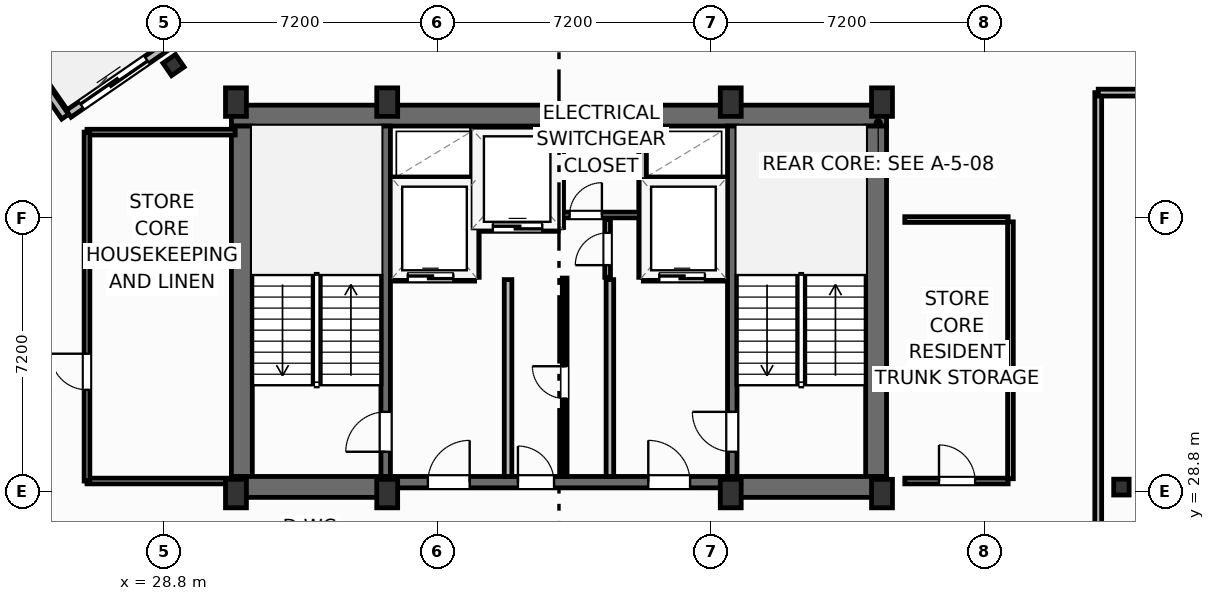
"""IFC4 building model, lengths in metres.
Left out: names, types, materials, properties, quantities, classifications, styles, units other than length and angle.
Written with IfcOpenShell. Run it as: python <this file> out.ifc"""

import sys

from ifc_helpers import new_model, si_unit, direction, frame, frame_2d, origin, origin_2d, place, context, subcontext, project, spatial, rectangle, i_section, extrude, element, fill, save


model = new_model("IFC4")
c1 = context("Model", 3, precision=1e-05, world=origin(), true_north=direction((0.0, 1.0)))
c2 = subcontext(c1, "Body", "Model", "MODEL_VIEW")
j1 = project(units=[si_unit("LENGTHUNIT", "METRE"), si_unit("PLANEANGLEUNIT", "RADIAN")], contexts=[c1])
p1 = place(None, origin())
s1 = spatial("IfcSite", under=j1, at=p1, CompositionType="ELEMENT")
p2 = place(p1, origin())
s2 = spatial("IfcBuilding", under=s1, at=p2, CompositionType="ELEMENT")
p3 = place(p2, frame((0.0, 0.0, 261.9)))
s3 = spatial("IfcBuildingStorey", under=s2, at=p3, CompositionType="ELEMENT", Elevation=261.9)
for number, where, z_axis, x_axis in (
    (1, (30.7, 28.75, 0.0), (0.0, 0.0, 1.0), (1.0, 0.0, 0.0)),
    (2, (34.68, 28.75, 0.0), (0.0, 0.0, 1.0), (1.0, 0.0, 0.0)),
    (3, (43.72, 28.75, 0.0), (0.0, 0.0, 1.0), (1.0, 0.0, 0.0)),
    (4, (47.7, 28.75, 0.0), (0.0, 0.0, 1.0), (1.0, 0.0, 0.0)),
    (5, (30.7, 39.05, 0.0), (0.0, 0.0, 1.0), (1.0, 0.0, 0.0)),
    (6, (34.68, 39.05, 0.0), (0.0, 0.0, 1.0), (1.0, 0.0, 0.0)),
    (7, (43.72, 39.05, 0.0), (0.0, 0.0, 1.0), (1.0, 0.0, 0.0)),
    (8, (47.7, 39.05, 0.0), (0.0, 0.0, 1.0), (1.0, 0.0, 0.0)),
):
    element("IfcColumn", number, at=place(p3, frame(where, z_axis=z_axis, x_axis=x_axis)), inside=s3, PredefinedType="COLUMN", context=c2, shape_type="SweptSolid", body=[
        extrude(rectangle(XDim=0.55, YDim=0.75, at=origin_2d()), origin(), (0.0, 0.0, 1.0), 3.7),
    ])
p4 = place(p3, frame((54.0, 28.92, 0.0), z_axis=(0.0, 0.0, 1.0), x_axis=(1.0, 0.0, 0.0)))
e9 = element("IfcColumn", 9, at=p4, inside=s3, PredefinedType="COLUMN", context=c2, shape_type="SweptSolid", body=[
    extrude(i_section(OverallWidth=0.406, OverallDepth=0.416, WebThickness=0.03, FlangeThickness=0.048, FilletRadius=0.025, at=origin_2d()), origin(), (0.0, 0.0, 1.0), 3.7),
])
p5 = place(p3, frame((30.58, 38.695, 0.0), z_axis=(0.0, 0.0, 1.0), x_axis=(1.0, 0.0, 0.0)))
e10 = element("IfcWall", 10, at=p5, inside=s3, PredefinedType="SHEAR", context=c2, shape_type="SweptSolid", body=[
    extrude(rectangle(XDim=17.24, YDim=0.55, at=frame_2d((8.62, 0.0))), origin(), (0.0, 0.0, 1.0), 3.45),
])
for number, where, z_axis, x_axis in (
    (11, (30.855, 29.2, 0.0), (0.0, 0.0, 1.0), (0.0, 1.0, 0.0)),
    (12, (47.545, 29.2, 0.0), (0.0, 0.0, 1.0), (0.0, 1.0, 0.0)),
):
    element("IfcWall", number, at=place(p3, frame(where, z_axis=z_axis, x_axis=x_axis)), inside=s3, PredefinedType="SHEAR", context=c2, shape_type="SweptSolid", body=[
        extrude(rectangle(XDim=9.22, YDim=0.55, at=frame_2d((4.61, 0.0))), origin(), (0.0, 0.0, 1.0), 3.45),
    ])
for number, where, z_axis, x_axis in (
    (13, (30.58, 28.925, 0.0), (0.0, 0.0, 1.0), (1.0, 0.0, 0.0)),
    (14, (43.6, 28.925, 0.0), (0.0, 0.0, 1.0), (1.0, 0.0, 0.0)),
):
    element("IfcWall", number, at=place(p3, frame(where, z_axis=z_axis, x_axis=x_axis)), inside=s3, PredefinedType="SHEAR", context=c2, shape_type="SweptSolid", body=[
        extrude(rectangle(XDim=4.22, YDim=0.55, at=frame_2d((2.11, 0.0))), origin(), (0.0, 0.0, 1.0), 3.45),
    ])
p6 = place(p3, frame((34.8, 29.05, 0.0), z_axis=(0.0, 0.0, 1.0), x_axis=(1.0, 0.0, 0.0)))
e15 = element("IfcWall", 15, at=p6, inside=s3, PredefinedType="SHEAR", context=c2, shape_type="SweptSolid", body=[
    extrude(rectangle(XDim=8.8, YDim=0.3, at=frame_2d((4.4, 0.0))), origin(), (0.0, 0.0, 1.0), 3.45),
])
p7 = place(p6, frame((0.95, 0.0, 0.0)))
e16 = element("IfcOpeningElement", 16, at=p7, cuts=e15, PredefinedType="OPENING", context=c2, shape_type="SweptSolid", body=[
    extrude(rectangle(XDim=1.1, YDim=2.15, at=frame_2d((0.55, 1.075))), frame((0.0, 0.16, 0.0), z_axis=(0.0, -1.0, 0.0), x_axis=(1.0, 0.0, 0.0)), (0.0, 0.0, 1.0), 0.32),
])
p8 = place(p6, frame((6.75, 0.0, 0.0)))
e17 = element("IfcOpeningElement", 17, at=p8, cuts=e15, PredefinedType="OPENING", context=c2, shape_type="SweptSolid", body=[
    extrude(rectangle(XDim=1.1, YDim=2.15, at=frame_2d((0.55, 1.075))), frame((0.0, 0.16, 0.0), z_axis=(0.0, -1.0, 0.0), x_axis=(1.0, 0.0, 0.0)), (0.0, 0.0, 1.0), 0.32),
])
p9 = place(p6, frame((3.32, 0.0, 0.0)))
e18 = element("IfcOpeningElement", 18, at=p9, cuts=e15, PredefinedType="OPENING", context=c2, shape_type="SweptSolid", body=[
    extrude(rectangle(XDim=0.95, YDim=2.15, at=frame_2d((0.475, 1.075))), frame((0.0, 0.16, 0.0), z_axis=(0.0, -1.0, 0.0), x_axis=(1.0, 0.0, 0.0)), (0.0, 0.0, 1.0), 0.32),
])
p10 = place(p3, frame((34.64, 29.2, 0.0), z_axis=(0.0, 0.0, 1.0), x_axis=(0.0, 1.0, 0.0)))
e19 = element("IfcWall", 19, at=p10, inside=s3, PredefinedType="SHEAR", context=c2, shape_type="SweptSolid", body=[
    extrude(rectangle(XDim=9.22, YDim=0.25, at=frame_2d((4.61, 0.0))), origin(), (0.0, 0.0, 1.0), 3.45),
])
p11 = place(p10, frame((0.65, 0.0, 0.0)))
e20 = element("IfcOpeningElement", 20, at=p11, cuts=e19, PredefinedType="OPENING", context=c2, shape_type="SweptSolid", body=[
    extrude(rectangle(XDim=1.05, YDim=2.15, at=frame_2d((0.525, 1.075))), frame((0.0, 0.135, 0.0), z_axis=(0.0, -1.0, 0.0), x_axis=(1.0, 0.0, 0.0)), (0.0, 0.0, 1.0), 0.27),
])
p12 = place(p3, frame((43.76, 29.2, 0.0), z_axis=(0.0, 0.0, 1.0), x_axis=(0.0, 1.0, 0.0)))
e21 = element("IfcWall", 21, at=p12, inside=s3, PredefinedType="SHEAR", context=c2, shape_type="SweptSolid", body=[
    extrude(rectangle(XDim=9.22, YDim=0.25, at=frame_2d((4.61, 0.0))), origin(), (0.0, 0.0, 1.0), 3.45),
])
p13 = place(p12, frame((0.65, 0.0, 0.0)))
e22 = element("IfcOpeningElement", 22, at=p13, cuts=e21, PredefinedType="OPENING", context=c2, shape_type="SweptSolid", body=[
    extrude(rectangle(XDim=1.05, YDim=2.15, at=frame_2d((0.525, 1.075))), frame((0.0, 0.135, 0.0), z_axis=(0.0, -1.0, 0.0), x_axis=(1.0, 0.0, 0.0)), (0.0, 0.0, 1.0), 0.27),
])
p14 = place(p3, frame((29.057, 40.025, 0.0), z_axis=(0.0, 0.0, 1.0), x_axis=(0.823532597628, 0.567268949127, 0.0)))
e23 = element("IfcColumn", 23, at=p14, inside=s3, PredefinedType="COLUMN", context=c2, shape_type="SweptSolid", body=[
    extrude(i_section(OverallWidth=0.401, OverallDepth=0.399, WebThickness=0.025, FlangeThickness=0.04, FilletRadius=0.022, at=origin_2d()), origin(), (0.0, 0.0, 1.0), 3.7),
])
p15 = place(p3, frame((26.297, 38.743, 0.0), z_axis=(0.0, 0.0, 1.0), x_axis=(0.823534636215, 0.567265989598, 0.0)))
e24 = element("IfcWall", 24, at=p15, inside=s3, PredefinedType="SOLIDWALL", context=c2, shape_type="SweptSolid", body=[
    extrude(rectangle(XDim=6.0, YDim=0.22, at=frame_2d((3.0, 0.0))), origin(), (0.0, 0.0, 1.0), 2.73),
])
p16 = place(p15, frame((0.4, 0.0, 0.0)))
e25 = element("IfcOpeningElement", 25, at=p16, cuts=e24, PredefinedType="OPENING", context=c2, shape_type="SweptSolid", body=[
    extrude(rectangle(XDim=2.1, YDim=2.3, at=frame_2d((1.05, 1.15))), frame((0.0, 0.12, 0.0), z_axis=(0.0, -1.0, 0.0), x_axis=(1.0, 0.0, 0.0)), (0.0, 0.0, 1.0), 0.24),
])
p17 = place(p3, frame((26.204, 38.667, 0.0), z_axis=(0.0, 0.0, 1.0), x_axis=(-0.567219383419, 0.823566737474, 0.0)))
e26 = element("IfcWall", 26, at=p17, inside=s3, PredefinedType="SOLIDWALL", context=c2, shape_type="SweptSolid", body=[
    extrude(rectangle(XDim=2.1, YDim=0.22, at=frame_2d((1.05, 0.0))), origin(), (0.0, 0.0, 1.0), 2.73),
])
p18 = place(p3, frame((53.39, 19.24, 0.0), z_axis=(0.0, 0.0, 1.0), x_axis=(0.0, 1.0, 0.0)))
e27 = element("IfcWall", 27, at=p18, inside=s3, PredefinedType="PARTITIONING", context=c2, shape_type="SweptSolid", body=[
    extrude(rectangle(XDim=20.06, YDim=0.18, at=frame_2d((10.03, 0.0))), origin(), (0.0, 0.0, 1.0), 3.45),
])
p19 = place(p18, frame((7.7, 0.0, 0.0)))
e28 = element("IfcOpeningElement", 28, at=p19, cuts=e27, PredefinedType="OPENING", context=c2, shape_type="SweptSolid", body=[
    extrude(rectangle(XDim=0.95, YDim=2.05, at=frame_2d((0.475, 1.025))), frame((0.0, 0.1, 0.0), z_axis=(0.0, -1.0, 0.0), x_axis=(1.0, 0.0, 0.0)), (0.0, 0.0, 1.0), 0.2),
])
p20 = place(p3, frame((53.39, 39.3, 0.0), z_axis=(0.0, 0.0, 1.0), x_axis=(1.0, 0.0, 0.0)))
e29 = element("IfcWall", 29, at=p20, inside=s3, PredefinedType="PARTITIONING", context=c2, shape_type="SweptSolid", body=[
    extrude(rectangle(XDim=16.149, YDim=0.18, at=frame_2d((8.075, 0.0))), origin(), (0.0, 0.0, 1.0), 2.739),
])
for number, where, z_axis, x_axis in (
    (30, (37.86, 29.2, 0.0), (0.0, 0.0, 1.0), (0.0, 1.0, 0.0)),
    (31, (40.54, 29.2, 0.0), (0.0, 0.0, 1.0), (0.0, 1.0, 0.0)),
):
    element("IfcWall", number, at=place(p3, frame(where, z_axis=z_axis, x_axis=x_axis)), inside=s3, PredefinedType="PARTITIONING", context=c2, shape_type="SweptSolid", body=[
        extrude(rectangle(XDim=5.18, YDim=0.2, at=frame_2d((2.59, 0.0))), origin(), (0.0, 0.0, 1.0), 3.45),
    ])
p21 = place(p3, frame((34.8, 34.44, 0.0), z_axis=(0.0, 0.0, 1.0), x_axis=(1.0, 0.0, 0.0)))
e32 = element("IfcWall", 32, at=p21, inside=s3, PredefinedType="PARTITIONING", context=c2, shape_type="SweptSolid", body=[
    extrude(rectangle(XDim=2.18, YDim=0.2, at=frame_2d((1.09, 0.0))), origin(), (0.0, 0.0, 1.0), 3.45),
])
p22 = place(p21, frame((0.42, 0.0, 0.0)))
e33 = element("IfcOpeningElement", 33, at=p22, cuts=e32, PredefinedType="OPENING", context=c2, shape_type="SweptSolid", body=[
    extrude(rectangle(XDim=1.2, YDim=2.2, at=frame_2d((0.6, 1.1))), frame((0.0, 0.11, 0.0), z_axis=(0.0, -1.0, 0.0), x_axis=(1.0, 0.0, 0.0)), (0.0, 0.0, 1.0), 0.22),
])
p23 = place(p3, frame((34.8, 36.98, 0.0), z_axis=(0.0, 0.0, 1.0), x_axis=(1.0, 0.0, 0.0)))
e34 = element("IfcWall", 34, at=p23, inside=s3, PredefinedType="PARTITIONING", context=c2, shape_type="SweptSolid", body=[
    extrude(rectangle(XDim=2.18, YDim=0.2, at=frame_2d((1.09, 0.0))), origin(), (0.0, 0.0, 1.0), 3.45),
])
p24 = place(p3, frame((37.0, 34.44, 0.0), z_axis=(0.0, 0.0, 1.0), x_axis=(0.0, 1.0, 0.0)))
e35 = element("IfcWall", 35, at=p24, inside=s3, PredefinedType="PARTITIONING", context=c2, shape_type="SweptSolid", body=[
    extrude(rectangle(XDim=3.9, YDim=0.2, at=frame_2d((1.95, 0.0))), origin(), (0.0, 0.0, 1.0), 3.45),
])
p25 = place(p3, frame((41.42, 34.44, 0.0), z_axis=(0.0, 0.0, 1.0), x_axis=(1.0, 0.0, 0.0)))
e36 = element("IfcWall", 36, at=p25, inside=s3, PredefinedType="PARTITIONING", context=c2, shape_type="SweptSolid", body=[
    extrude(rectangle(XDim=2.18, YDim=0.2, at=frame_2d((1.09, 0.0))), origin(), (0.0, 0.0, 1.0), 3.45),
])
p26 = place(p25, frame((0.42, 0.0, 0.0)))
e37 = element("IfcOpeningElement", 37, at=p26, cuts=e36, PredefinedType="OPENING", context=c2, shape_type="SweptSolid", body=[
    extrude(rectangle(XDim=1.2, YDim=2.2, at=frame_2d((0.6, 1.1))), frame((0.0, 0.11, 0.0), z_axis=(0.0, -1.0, 0.0), x_axis=(1.0, 0.0, 0.0)), (0.0, 0.0, 1.0), 0.22),
])
p27 = place(p3, frame((41.42, 36.98, 0.0), z_axis=(0.0, 0.0, 1.0), x_axis=(1.0, 0.0, 0.0)))
e38 = element("IfcWall", 38, at=p27, inside=s3, PredefinedType="PARTITIONING", context=c2, shape_type="SweptSolid", body=[
    extrude(rectangle(XDim=2.18, YDim=0.2, at=frame_2d((1.09, 0.0))), origin(), (0.0, 0.0, 1.0), 3.45),
])
p28 = place(p3, frame((41.4, 34.44, 0.0), z_axis=(0.0, 0.0, 1.0), x_axis=(0.0, 1.0, 0.0)))
e39 = element("IfcWall", 39, at=p28, inside=s3, PredefinedType="PARTITIONING", context=c2, shape_type="SweptSolid", body=[
    extrude(rectangle(XDim=3.9, YDim=0.2, at=frame_2d((1.95, 0.0))), origin(), (0.0, 0.0, 1.0), 3.45),
])
p29 = place(p3, frame((37.06, 35.75, 0.0), z_axis=(0.0, 0.0, 1.0), x_axis=(1.0, 0.0, 0.0)))
e40 = element("IfcWall", 40, at=p29, inside=s3, PredefinedType="PARTITIONING", context=c2, shape_type="SweptSolid", body=[
    extrude(rectangle(XDim=2.12, YDim=0.2, at=frame_2d((1.06, 0.0))), origin(), (0.0, 0.0, 1.0), 3.45),
])
p30 = place(p29, frame((0.4, 0.0, 0.0)))
e41 = element("IfcOpeningElement", 41, at=p30, cuts=e40, PredefinedType="OPENING", context=c2, shape_type="SweptSolid", body=[
    extrude(rectangle(XDim=1.3, YDim=2.2, at=frame_2d((0.65, 1.1))), frame((0.0, 0.11, 0.0), z_axis=(0.0, -1.0, 0.0), x_axis=(1.0, 0.0, 0.0)), (0.0, 0.0, 1.0), 0.22),
])
p31 = place(p3, frame((39.22, 35.75, 0.0), z_axis=(0.0, 0.0, 1.0), x_axis=(0.0, 1.0, 0.0)))
e42 = element("IfcWall", 42, at=p31, inside=s3, PredefinedType="PARTITIONING", context=c2, shape_type="SweptSolid", body=[
    extrude(rectangle(XDim=2.59, YDim=0.2, at=frame_2d((1.295, 0.0))), origin(), (0.0, 0.0, 1.0), 3.45),
])
p32 = place(p3, frame((39.3, 36.08, 0.0), z_axis=(0.0, 0.0, 1.0), x_axis=(1.0, 0.0, 0.0)))
e43 = element("IfcWall", 43, at=p32, inside=s3, PredefinedType="PARTITIONING", context=c2, shape_type="SweptSolid", body=[
    extrude(rectangle(XDim=2.02, YDim=0.15, at=frame_2d((1.01, 0.0))), origin(), (0.0, 0.0, 1.0), 3.45),
])
p33 = place(p32, frame((0.18, 0.0, 0.0)))
e44 = element("IfcOpeningElement", 44, at=p33, cuts=e43, PredefinedType="OPENING", context=c2, shape_type="SweptSolid", body=[
    extrude(rectangle(XDim=0.85, YDim=2.05, at=frame_2d((0.425, 1.025))), frame((0.0, 0.085, 0.0), z_axis=(0.0, -1.0, 0.0), x_axis=(1.0, 0.0, 0.0)), (0.0, 0.0, 1.0), 0.17),
])
p34 = place(p3, frame((40.48, 34.44, 0.0), z_axis=(0.0, 0.0, 1.0), x_axis=(0.0, 1.0, 0.0)))
e45 = element("IfcWall", 45, at=p34, inside=s3, PredefinedType="PARTITIONING", context=c2, shape_type="SweptSolid", body=[
    extrude(rectangle(XDim=1.52, YDim=0.15, at=frame_2d((0.76, 0.0))), origin(), (0.0, 0.0, 1.0), 3.45),
])
p35 = place(p34, frame((0.32, 0.0, 0.0)))
e46 = element("IfcOpeningElement", 46, at=p35, cuts=e45, PredefinedType="OPENING", context=c2, shape_type="SweptSolid", body=[
    extrude(rectangle(XDim=0.85, YDim=2.05, at=frame_2d((0.425, 1.025))), frame((0.0, 0.085, 0.0), z_axis=(0.0, -1.0, 0.0), x_axis=(1.0, 0.0, 0.0)), (0.0, 0.0, 1.0), 0.17),
])
p36 = place(p3, frame((39.35, 29.2, 0.0), z_axis=(0.0, 0.0, 1.0), x_axis=(0.0, 1.0, 0.0)))
e47 = element("IfcWall", 47, at=p36, inside=s3, PredefinedType="PARTITIONING", context=c2, shape_type="SweptSolid", body=[
    extrude(rectangle(XDim=5.22, YDim=0.125, at=frame_2d((2.61, 0.0))), origin(), (0.0, 0.0, 1.0), 3.45),
])
p37 = place(p36, frame((2.05, 0.0, 0.0)))
e48 = element("IfcOpeningElement", 48, at=p37, cuts=e47, PredefinedType="OPENING", context=c2, shape_type="SweptSolid", body=[
    extrude(rectangle(XDim=0.85, YDim=2.05, at=frame_2d((0.425, 1.025))), frame((0.0, 0.073, 0.0), z_axis=(0.0, -1.0, 0.0), x_axis=(1.0, 0.0, 0.0)), (0.0, 0.0, 1.0), 0.145),
])
p38 = place(p3, frame((26.78, 29.08, 0.0), z_axis=(0.0, 0.0, 1.0), x_axis=(1.0, 0.0, 0.0)))
e49 = element("IfcWall", 49, at=p38, inside=s3, PredefinedType="PARTITIONING", context=c2, shape_type="SweptSolid", body=[
    extrude(rectangle(XDim=3.8, YDim=0.15, at=frame_2d((1.9, 0.0))), origin(), (0.0, 0.0, 1.0), 3.45),
])
p39 = place(p3, frame((26.78, 38.26, 0.0), z_axis=(0.0, 0.0, 1.0), x_axis=(1.0, 0.0, 0.0)))
e50 = element("IfcWall", 50, at=p39, inside=s3, PredefinedType="PARTITIONING", context=c2, shape_type="SweptSolid", body=[
    extrude(rectangle(XDim=3.9, YDim=0.15, at=frame_2d((1.95, 0.0))), origin(), (0.0, 0.0, 1.0), 3.45),
])
p40 = place(p3, frame((26.78, 29.08, 0.0), z_axis=(0.0, 0.0, 1.0), x_axis=(0.0, 1.0, 0.0)))
e51 = element("IfcWall", 51, at=p40, inside=s3, PredefinedType="PARTITIONING", context=c2, shape_type="SweptSolid", body=[
    extrude(rectangle(XDim=9.18, YDim=0.15, at=frame_2d((4.59, 0.0))), origin(), (0.0, 0.0, 1.0), 3.45),
])
p41 = place(p40, frame((2.4, 0.0, 0.0)))
e52 = element("IfcOpeningElement", 52, at=p41, cuts=e51, PredefinedType="OPENING", context=c2, shape_type="SweptSolid", body=[
    extrude(rectangle(XDim=0.95, YDim=2.05, at=frame_2d((0.475, 1.025))), frame((0.0, 0.085, 0.0), z_axis=(0.0, -1.0, 0.0), x_axis=(1.0, 0.0, 0.0)), (0.0, 0.0, 1.0), 0.17),
])
p42 = place(p3, frame((48.3, 29.08, 0.0), z_axis=(0.0, 0.0, 1.0), x_axis=(1.0, 0.0, 0.0)))
e53 = element("IfcWall", 53, at=p42, inside=s3, PredefinedType="PARTITIONING", context=c2, shape_type="SweptSolid", body=[
    extrude(rectangle(XDim=2.72, YDim=0.15, at=frame_2d((1.36, 0.0))), origin(), (0.0, 0.0, 1.0), 2.662),
])
p43 = place(p42, frame((0.9, 0.0, 0.0)))
e54 = element("IfcOpeningElement", 54, at=p43, cuts=e53, PredefinedType="OPENING", context=c2, shape_type="SweptSolid", body=[
    extrude(rectangle(XDim=0.95, YDim=2.05, at=frame_2d((0.475, 1.025))), frame((0.0, 0.085, 0.0), z_axis=(0.0, -1.0, 0.0), x_axis=(1.0, 0.0, 0.0)), (0.0, 0.0, 1.0), 0.17),
])
p44 = place(p3, frame((48.3, 35.96, 0.0), z_axis=(0.0, 0.0, 1.0), x_axis=(1.0, 0.0, 0.0)))
e55 = element("IfcWall", 55, at=p44, inside=s3, PredefinedType="PARTITIONING", context=c2, shape_type="SweptSolid", body=[
    extrude(rectangle(XDim=2.72, YDim=0.15, at=frame_2d((1.36, 0.0))), origin(), (0.0, 0.0, 1.0), 3.45),
])
p45 = place(p3, frame((51.08, 29.14, 0.0), z_axis=(0.0, 0.0, 1.0), x_axis=(0.0, 1.0, 0.0)))
e56 = element("IfcWall", 56, at=p45, inside=s3, PredefinedType="PARTITIONING", context=c2, shape_type="SweptSolid", body=[
    extrude(rectangle(XDim=6.76, YDim=0.15, at=frame_2d((3.38, 0.0))), origin(), (0.0, 0.0, 1.0), 3.45),
])
p46 = place(p16, origin())
e57 = element("IfcDoor", 57, at=p46, inside=s3, OperationType="SLIDING_TO_LEFT", PredefinedType="DOOR", context=c2, shape_type="SweptSolid", body=[
    extrude(rectangle(XDim=2.1, YDim=2.3, at=frame_2d((1.05, 1.15))), frame((0.0, 0.025, 0.0), z_axis=(0.0, -1.0, 0.0), x_axis=(1.0, 0.0, 0.0)), (0.0, 0.0, 1.0), 0.05),
])
fill(e25, e57)
p47 = place(p11, origin())
e58 = element("IfcDoor", 58, at=p47, inside=s3, OperationType="SINGLE_SWING_LEFT", PredefinedType="DOOR", context=c2, shape_type="SweptSolid", body=[
    extrude(rectangle(XDim=1.05, YDim=2.15, at=frame_2d((0.525, 1.075))), frame((0.0, 0.025, 0.0), z_axis=(0.0, -1.0, 0.0), x_axis=(1.0, 0.0, 0.0)), (0.0, 0.0, 1.0), 0.05),
])
fill(e20, e58)
p48 = place(p13, origin())
e59 = element("IfcDoor", 59, at=p48, inside=s3, OperationType="SINGLE_SWING_RIGHT", PredefinedType="DOOR", context=c2, shape_type="SweptSolid", body=[
    extrude(rectangle(XDim=1.05, YDim=2.15, at=frame_2d((0.525, 1.075))), frame((0.0, 0.025, 0.0), z_axis=(0.0, -1.0, 0.0), x_axis=(1.0, 0.0, 0.0)), (0.0, 0.0, 1.0), 0.05),
])
fill(e22, e59)
p49 = place(p7, origin())
e60 = element("IfcDoor", 60, at=p49, inside=s3, OperationType="SINGLE_SWING_RIGHT", PredefinedType="DOOR", context=c2, shape_type="SweptSolid", body=[
    extrude(rectangle(XDim=1.1, YDim=2.15, at=frame_2d((0.55, 1.075))), frame((0.0, 0.025, 0.0), z_axis=(0.0, -1.0, 0.0), x_axis=(1.0, 0.0, 0.0)), (0.0, 0.0, 1.0), 0.05),
])
fill(e16, e60)
p50 = place(p8, origin())
e61 = element("IfcDoor", 61, at=p50, inside=s3, OperationType="SINGLE_SWING_LEFT", PredefinedType="DOOR", context=c2, shape_type="SweptSolid", body=[
    extrude(rectangle(XDim=1.1, YDim=2.15, at=frame_2d((0.55, 1.075))), frame((0.0, 0.025, 0.0), z_axis=(0.0, -1.0, 0.0), x_axis=(1.0, 0.0, 0.0)), (0.0, 0.0, 1.0), 0.05),
])
fill(e17, e61)
p51 = place(p22, origin())
e62 = element("IfcDoor", 62, at=p51, inside=s3, OperationType="SLIDING_TO_LEFT", PredefinedType="DOOR", context=c2, shape_type="SweptSolid", body=[
    extrude(rectangle(XDim=1.2, YDim=2.2, at=frame_2d((0.6, 1.1))), frame((0.0, 0.025, 0.0), z_axis=(0.0, -1.0, 0.0), x_axis=(1.0, 0.0, 0.0)), (0.0, 0.0, 1.0), 0.05),
])
fill(e33, e62)
p52 = place(p26, origin())
e63 = element("IfcDoor", 63, at=p52, inside=s3, OperationType="SLIDING_TO_LEFT", PredefinedType="DOOR", context=c2, shape_type="SweptSolid", body=[
    extrude(rectangle(XDim=1.2, YDim=2.2, at=frame_2d((0.6, 1.1))), frame((0.0, 0.025, 0.0), z_axis=(0.0, -1.0, 0.0), x_axis=(1.0, 0.0, 0.0)), (0.0, 0.0, 1.0), 0.05),
])
fill(e37, e63)
p53 = place(p30, origin())
e64 = element("IfcDoor", 64, at=p53, inside=s3, OperationType="SLIDING_TO_LEFT", PredefinedType="DOOR", context=c2, shape_type="SweptSolid", body=[
    extrude(rectangle(XDim=1.3, YDim=2.2, at=frame_2d((0.65, 1.1))), frame((0.0, 0.025, 0.0), z_axis=(0.0, -1.0, 0.0), x_axis=(1.0, 0.0, 0.0)), (0.0, 0.0, 1.0), 0.05),
])
fill(e41, e64)
p54 = place(p33, origin())
e65 = element("IfcDoor", 65, at=p54, inside=s3, OperationType="SINGLE_SWING_RIGHT", PredefinedType="DOOR", context=c2, shape_type="SweptSolid", body=[
    extrude(rectangle(XDim=0.85, YDim=2.05, at=frame_2d((0.425, 1.025))), frame((0.0, 0.025, 0.0), z_axis=(0.0, -1.0, 0.0), x_axis=(1.0, 0.0, 0.0)), (0.0, 0.0, 1.0), 0.05),
])
fill(e44, e65)
p55 = place(p35, origin())
e66 = element("IfcDoor", 66, at=p55, inside=s3, OperationType="SINGLE_SWING_LEFT", PredefinedType="DOOR", context=c2, shape_type="SweptSolid", body=[
    extrude(rectangle(XDim=0.85, YDim=2.05, at=frame_2d((0.425, 1.025))), frame((0.0, 0.025, 0.0), z_axis=(0.0, -1.0, 0.0), x_axis=(1.0, 0.0, 0.0)), (0.0, 0.0, 1.0), 0.05),
])
fill(e46, e66)
p56 = place(p37, origin())
e67 = element("IfcDoor", 67, at=p56, inside=s3, OperationType="SINGLE_SWING_RIGHT", PredefinedType="DOOR", context=c2, shape_type="SweptSolid", body=[
    extrude(rectangle(XDim=0.85, YDim=2.05, at=frame_2d((0.425, 1.025))), frame((0.0, 0.025, 0.0), z_axis=(0.0, -1.0, 0.0), x_axis=(1.0, 0.0, 0.0)), (0.0, 0.0, 1.0), 0.05),
])
fill(e48, e67)
p57 = place(p9, origin())
e68 = element("IfcDoor", 68, at=p57, inside=s3, OperationType="SINGLE_SWING_LEFT", PredefinedType="DOOR", context=c2, shape_type="SweptSolid", body=[
    extrude(rectangle(XDim=0.95, YDim=2.15, at=frame_2d((0.475, 1.075))), frame((0.0, 0.025, 0.0), z_axis=(0.0, -1.0, 0.0), x_axis=(1.0, 0.0, 0.0)), (0.0, 0.0, 1.0), 0.05),
])
fill(e18, e68)
p58 = place(p41, origin())
e69 = element("IfcDoor", 69, at=p58, inside=s3, OperationType="SINGLE_SWING_RIGHT", PredefinedType="DOOR", context=c2, shape_type="SweptSolid", body=[
    extrude(rectangle(XDim=0.95, YDim=2.05, at=frame_2d((0.475, 1.025))), frame((0.0, 0.025, 0.0), z_axis=(0.0, -1.0, 0.0), x_axis=(1.0, 0.0, 0.0)), (0.0, 0.0, 1.0), 0.05),
])
fill(e52, e69)
p59 = place(p43, origin())
e70 = element("IfcDoor", 70, at=p59, inside=s3, OperationType="SINGLE_SWING_LEFT", PredefinedType="DOOR", context=c2, shape_type="SweptSolid", body=[
    extrude(rectangle(XDim=0.95, YDim=2.05, at=frame_2d((0.475, 1.025))), frame((0.0, 0.025, 0.0), z_axis=(0.0, -1.0, 0.0), x_axis=(1.0, 0.0, 0.0)), (0.0, 0.0, 1.0), 0.05),
])
fill(e54, e70)
save(model, sys.argv[1])
